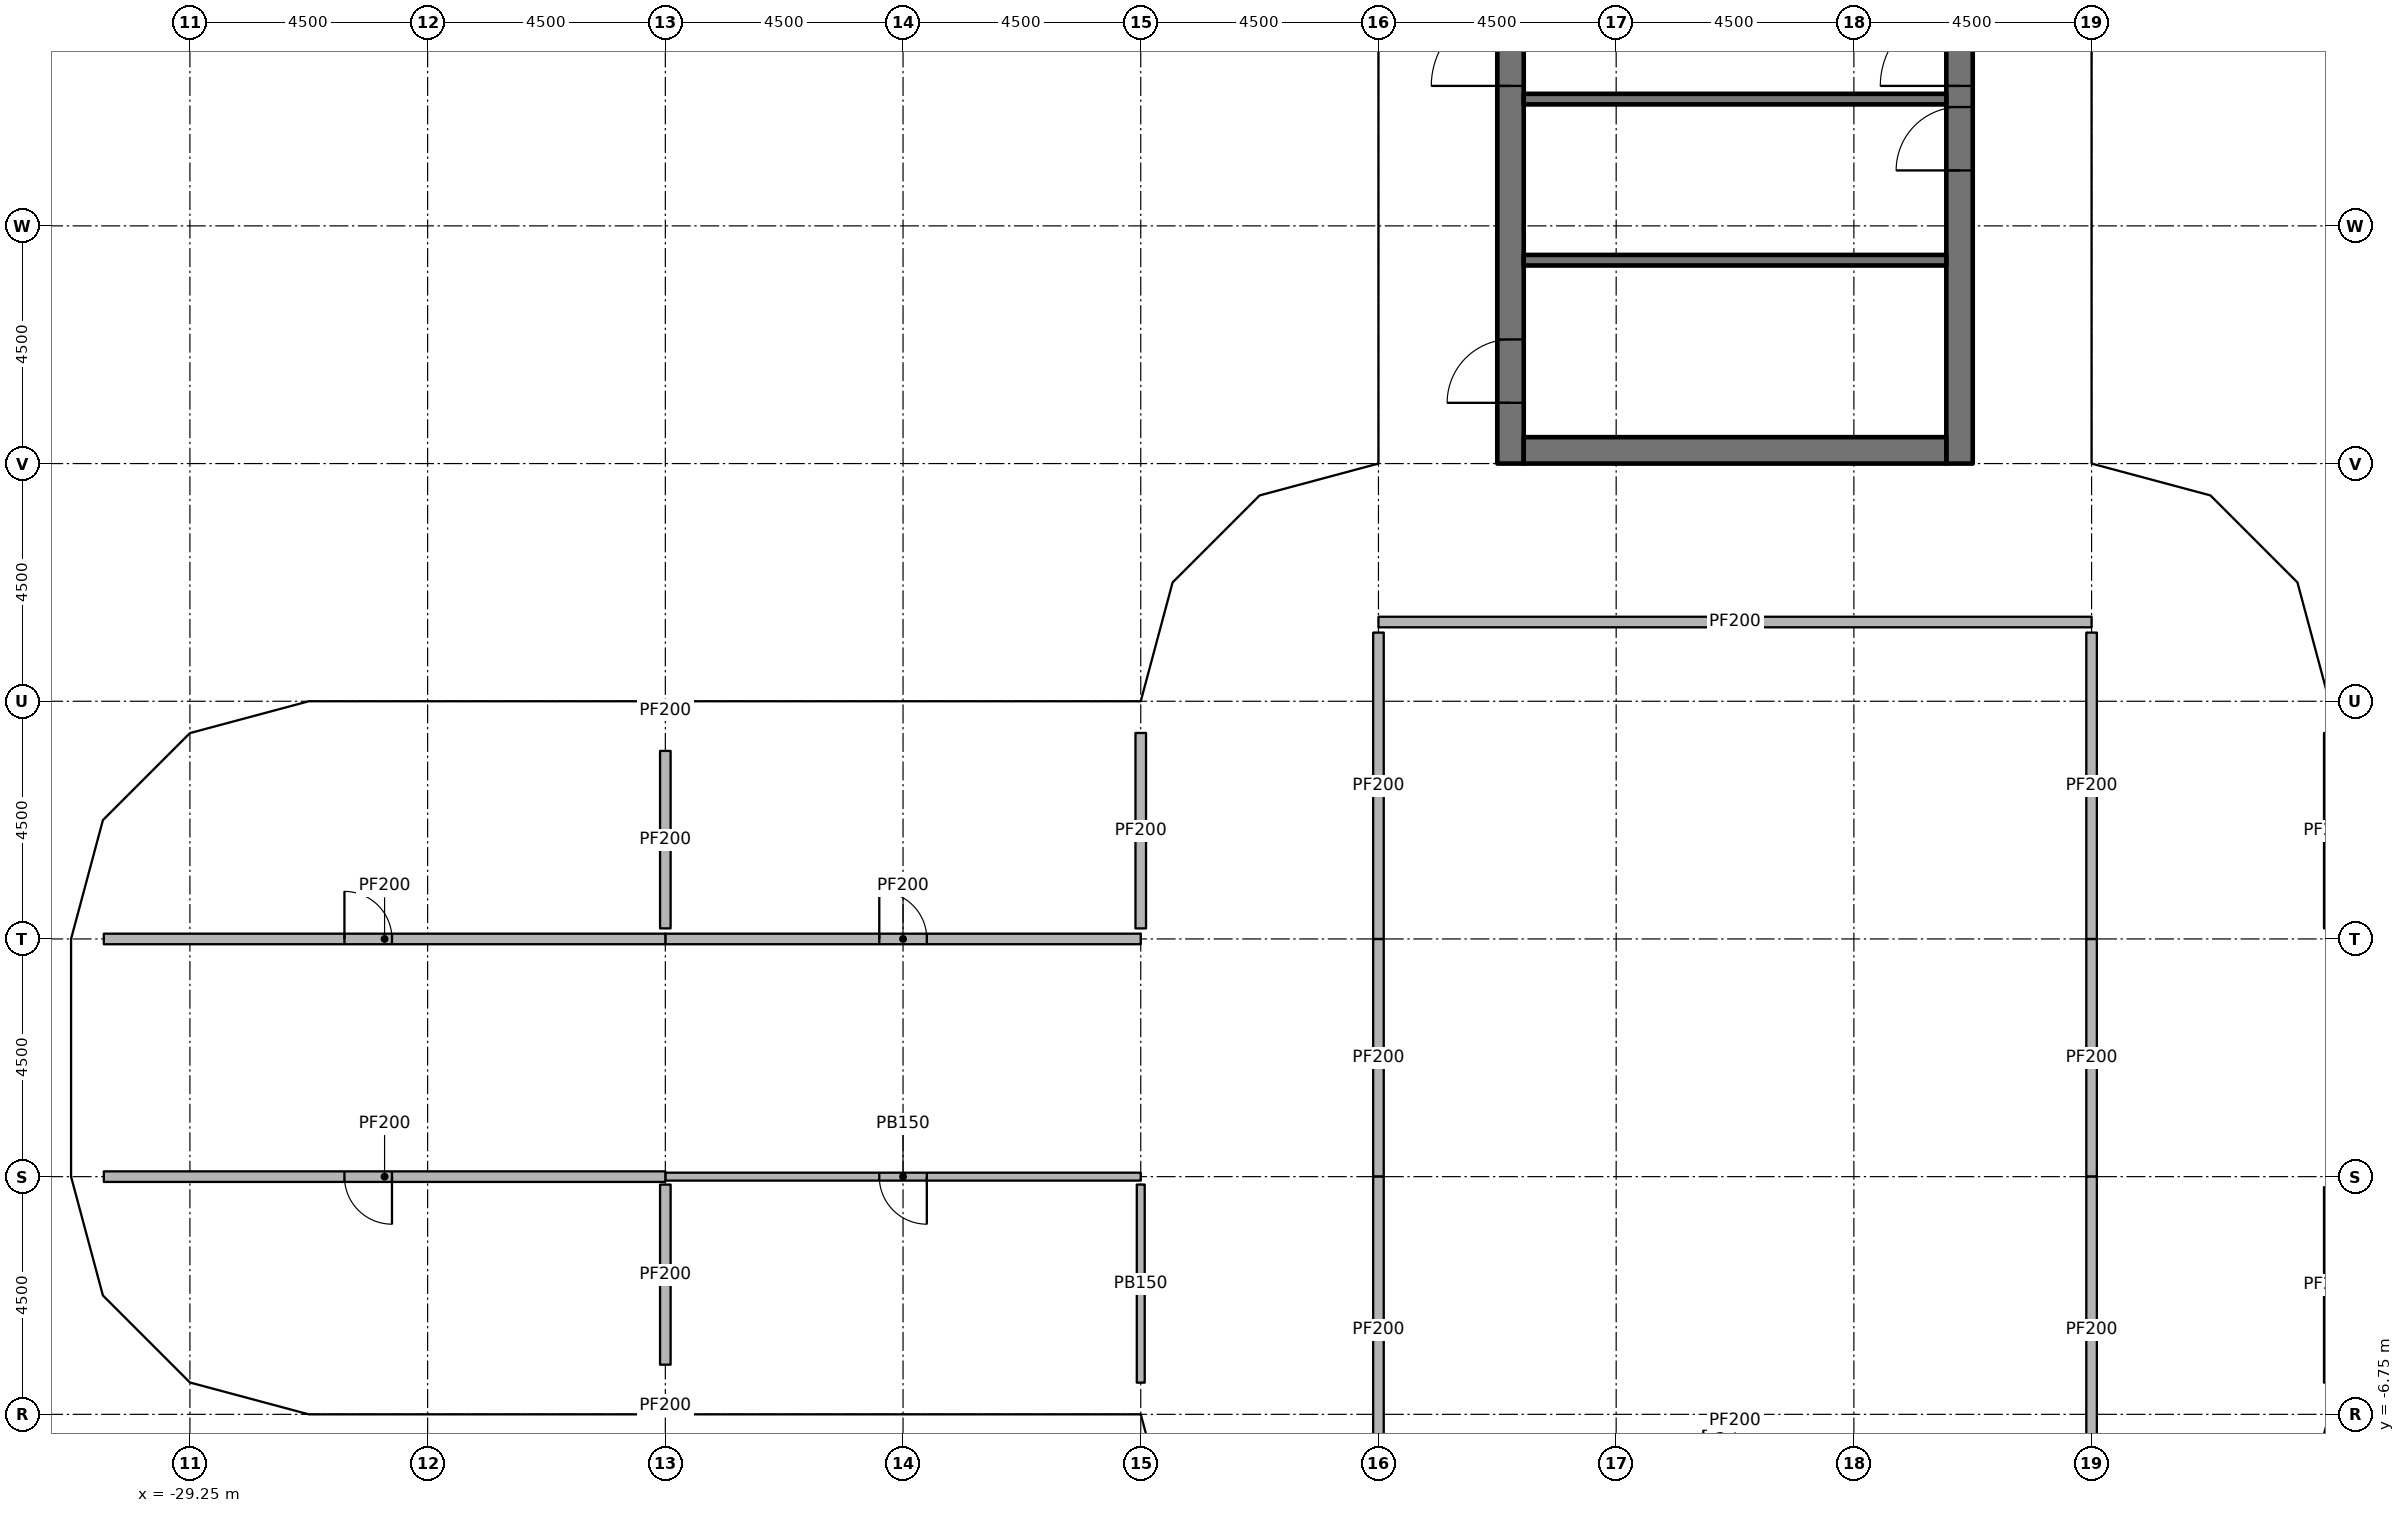
"""IFC4 building model, lengths in metres.
Left out: names, types, materials, properties, quantities, classifications, styles, units other than length and angle.
Written with IfcOpenShell. Run it as: python <this file> out.ifc"""

import sys

from ifc_helpers import new_model, si_unit, direction, frame, frame_2d, origin, origin_2d, place, context, subcontext, project, spatial, rectangle, extrude, element, fill, save


model = new_model("IFC4")
c1 = context("Model", 3, precision=1e-05, world=origin(), true_north=direction((0.0, 1.0)))
c2 = subcontext(c1, "Body", "Model", "MODEL_VIEW")
j1 = project(units=[si_unit("LENGTHUNIT", "METRE"), si_unit("PLANEANGLEUNIT", "RADIAN")], contexts=[c1])
p1 = place(None, origin())
s1 = spatial("IfcSite", under=j1, at=p1, CompositionType="ELEMENT")
p2 = place(p1, origin())
s2 = spatial("IfcBuilding", under=s1, at=p2, CompositionType="ELEMENT")
p3 = place(p2, frame((0.0, 0.0, 284.0)))
s3 = spatial("IfcBuildingStorey", under=s2, at=p3, CompositionType="ELEMENT", Elevation=284.0)
for number, where, z_axis, x_axis in (
    (1, (-28.908, -5.475, 0.0), (0.0, 0.0, 1.0), (1.0, 0.0, 0.0)),
    (2, (-28.908, 5.475, 0.0), (0.0, 0.0, 1.0), (1.0, 0.0, 0.0)),
    (3, (-24.75, -6.25, 0.0), (0.0, 0.0, 1.0), (1.0, 0.0, 0.0)),
    (4, (-24.75, 6.25, 0.0), (0.0, 0.0, 1.0), (1.0, 0.0, 0.0)),
    (5, (-20.25, -6.11, 0.0), (0.0, 0.0, 1.0), (1.0, 0.0, 0.0)),
    (6, (-20.25, 6.11, 0.0), (0.0, 0.0, 1.0), (1.0, 0.0, 0.0)),
    (7, (-15.75, -6.25, 0.0), (0.0, 0.0, 1.0), (1.0, 0.0, 0.0)),
    (8, (-15.75, 6.25, 0.0), (0.0, 0.0, 1.0), (1.0, 0.0, 0.0)),
    (9, (-10.75, -6.25, 0.0), (0.0, 0.0, 1.0), (1.0, 0.0, 0.0)),
    (10, (-10.75, 6.25, 0.0), (0.0, 0.0, 1.0), (1.0, 0.0, 0.0)),
    (11, (-6.25, -6.25, 0.0), (0.0, 0.0, 1.0), (1.0, 0.0, 0.0)),
    (12, (-6.25, 6.25, 0.0), (0.0, 0.0, 1.0), (1.0, 0.0, 0.0)),
    (13, (-6.25, 10.75, 0.0), (0.0, 0.0, 1.0), (1.0, 0.0, 0.0)),
    (14, (-6.25, 15.75, 0.0), (0.0, 0.0, 1.0), (1.0, 0.0, 0.0)),
    (15, (6.25, -6.25, 0.0), (0.0, 0.0, 1.0), (1.0, 0.0, 0.0)),
    (16, (6.25, 6.25, 0.0), (0.0, 0.0, 1.0), (1.0, 0.0, 0.0)),
    (17, (6.25, 10.75, 0.0), (0.0, 0.0, 1.0), (1.0, 0.0, 0.0)),
    (18, (6.25, 15.75, 0.0), (0.0, 0.0, 1.0), (1.0, 0.0, 0.0)),
    (19, (10.75, -6.25, 0.0), (0.0, 0.0, 1.0), (1.0, 0.0, 0.0)),
    (20, (10.75, 6.25, 0.0), (0.0, 0.0, 1.0), (1.0, 0.0, 0.0)),
):
    element("IfcColumn", number, at=place(p3, frame(where, z_axis=z_axis, x_axis=x_axis)), inside=s3, PredefinedType="COLUMN", context=c2, shape_type="SweptSolid", body=[
        extrude(rectangle(XDim=0.6, YDim=0.6, at=origin_2d()), origin(), (0.0, 0.0, 1.0), 7.45),
    ])
p4 = place(p3, frame((-4.25, 11.25, 0.0), z_axis=(0.0, 0.0, 1.0), x_axis=(0.0, 1.0, 0.0)))
e21 = element("IfcWall", 21, at=p4, inside=s3, PredefinedType="SHEAR", context=c2, shape_type="SweptSolid", body=[
    extrude(rectangle(XDim=15.0, YDim=0.5, at=frame_2d((7.5, 0.0))), origin(), (0.0, 0.0, 1.0), 7.6),
])
p5 = place(p4, frame((7.15, 0.0, 0.0)))
e22 = element("IfcOpeningElement", 22, at=p5, cuts=e21, PredefinedType="OPENING", context=c2, shape_type="SweptSolid", body=[
    extrude(rectangle(XDim=1.5, YDim=2.3, at=frame_2d((0.75, 1.15))), frame((0.0, 0.26, 0.0), z_axis=(0.0, -1.0, 0.0), x_axis=(1.0, 0.0, 0.0)), (0.0, 0.0, 1.0), 0.52),
])
p6 = place(p4, frame((13.9, 0.0, 0.0)))
e23 = element("IfcOpeningElement", 23, at=p6, cuts=e21, PredefinedType="OPENING", context=c2, shape_type="SweptSolid", body=[
    extrude(rectangle(XDim=0.9, YDim=2.1, at=frame_2d((0.45, 1.05))), frame((0.0, 0.26, 0.0), z_axis=(0.0, -1.0, 0.0), x_axis=(1.0, 0.0, 0.0)), (0.0, 0.0, 1.0), 0.52),
])
p7 = place(p4, frame((1.15, 0.0, 0.0)))
e24 = element("IfcOpeningElement", 24, at=p7, cuts=e21, PredefinedType="OPENING", context=c2, shape_type="SweptSolid", body=[
    extrude(rectangle(XDim=1.2, YDim=2.1, at=frame_2d((0.6, 1.05))), frame((0.0, 0.26, 0.0), z_axis=(0.0, -1.0, 0.0), x_axis=(1.0, 0.0, 0.0)), (0.0, 0.0, 1.0), 0.52),
])
p8 = place(p3, frame((4.25, 11.25, 0.0), z_axis=(0.0, 0.0, 1.0), x_axis=(0.0, 1.0, 0.0)))
e25 = element("IfcWall", 25, at=p8, inside=s3, PredefinedType="SHEAR", context=c2, shape_type="SweptSolid", body=[
    extrude(rectangle(XDim=15.0, YDim=0.5, at=frame_2d((7.5, 0.0))), origin(), (0.0, 0.0, 1.0), 7.6),
])
p9 = place(p8, frame((7.15, 0.0, 0.0)))
e26 = element("IfcOpeningElement", 26, at=p9, cuts=e25, PredefinedType="OPENING", context=c2, shape_type="SweptSolid", body=[
    extrude(rectangle(XDim=1.5, YDim=2.3, at=frame_2d((0.75, 1.15))), frame((0.0, 0.26, 0.0), z_axis=(0.0, -1.0, 0.0), x_axis=(1.0, 0.0, 0.0)), (0.0, 0.0, 1.0), 0.52),
])
p10 = place(p8, frame((5.55, 0.0, 0.0)))
e27 = element("IfcOpeningElement", 27, at=p10, cuts=e25, PredefinedType="OPENING", context=c2, shape_type="SweptSolid", body=[
    extrude(rectangle(XDim=1.2, YDim=2.1, at=frame_2d((0.6, 1.05))), frame((0.0, 0.26, 0.0), z_axis=(0.0, -1.0, 0.0), x_axis=(1.0, 0.0, 0.0)), (0.0, 0.0, 1.0), 0.52),
])
p11 = place(p3, frame((-4.0, 11.5, 0.0), z_axis=(0.0, 0.0, 1.0), x_axis=(1.0, 0.0, 0.0)))
e28 = element("IfcWall", 28, at=p11, inside=s3, PredefinedType="SHEAR", context=c2, shape_type="SweptSolid", body=[
    extrude(rectangle(XDim=8.0, YDim=0.5, at=frame_2d((4.0, 0.0))), origin(), (0.0, 0.0, 1.0), 7.6),
])
for number, where, z_axis, x_axis in (
    (29, (-4.0, 18.15, 0.0), (0.0, 0.0, 1.0), (1.0, 0.0, 0.0)),
    (30, (-4.0, 15.1, 0.0), (0.0, 0.0, 1.0), (1.0, 0.0, 0.0)),
):
    element("IfcWall", number, at=place(p3, frame(where, z_axis=z_axis, x_axis=x_axis)), inside=s3, PredefinedType="SHEAR", context=c2, shape_type="SweptSolid", body=[
        extrude(rectangle(XDim=8.0, YDim=0.2, at=frame_2d((4.0, 0.0))), origin(), (0.0, 0.0, 1.0), 7.45),
    ])
p12 = place(p3, frame((-6.75, 8.25, 0.0), z_axis=(0.0, 0.0, 1.0), x_axis=(1.0, 0.0, 0.0)))
e31 = element("IfcWall", 31, at=p12, inside=s3, PredefinedType="PARTITIONING", context=c2, shape_type="SweptSolid", body=[
    extrude(rectangle(XDim=13.5, YDim=0.2, at=frame_2d((6.75, 0.0))), origin(), (0.0, 0.0, 1.0), 7.45),
])
for number, where, z_axis, x_axis in (
    (32, (6.75, 2.25, 0.0), (0.0, 0.0, 1.0), (0.0, -1.0, 0.0)),
    (33, (-6.75, -2.25, 0.0), (0.0, 0.0, 1.0), (0.0, 1.0, 0.0)),
):
    element("IfcWall", number, at=place(p3, frame(where, z_axis=z_axis, x_axis=x_axis)), inside=s3, PredefinedType="PARTITIONING", context=c2, shape_type="SweptSolid", body=[
        extrude(rectangle(XDim=4.5, YDim=0.2, at=frame_2d((2.25, 0.0))), origin(), (0.0, 0.0, 1.0), 7.45),
    ])
for number, where, z_axis, x_axis in (
    (34, (-6.75, -8.05, 0.0), (0.0, 0.0, 1.0), (0.0, 1.0, 0.0)),
    (35, (6.75, -2.25, 0.0), (0.0, 0.0, 1.0), (0.0, -1.0, 0.0)),
    (36, (-6.75, 2.25, 0.0), (0.0, 0.0, 1.0), (0.0, 1.0, 0.0)),
    (37, (6.75, 8.05, 0.0), (0.0, 0.0, 1.0), (0.0, -1.0, 0.0)),
):
    element("IfcWall", number, at=place(p3, frame(where, z_axis=z_axis, x_axis=x_axis)), inside=s3, PredefinedType="PARTITIONING", context=c2, shape_type="SweptSolid", body=[
        extrude(rectangle(XDim=5.8, YDim=0.2, at=frame_2d((2.9, 0.0))), origin(), (0.0, 0.0, 1.0), 6.681),
    ])
p13 = place(p3, frame((-20.25, 2.25, 0.0), z_axis=(0.0, 0.0, 1.0), x_axis=(1.0, 0.0, 0.0)))
e38 = element("IfcWall", 38, at=p13, inside=s3, PredefinedType="PARTITIONING", context=c2, shape_type="SweptSolid", body=[
    extrude(rectangle(XDim=9.0, YDim=0.2, at=frame_2d((4.5, 0.0))), origin(), (0.0, 0.0, 1.0), 6.828),
])
p14 = place(p13, frame((4.05, 0.0, 0.0)))
e39 = element("IfcOpeningElement", 39, at=p14, cuts=e38, PredefinedType="OPENING", context=c2, shape_type="SweptSolid", body=[
    extrude(rectangle(XDim=0.9, YDim=2.1, at=frame_2d((0.45, 1.05))), frame((0.0, 0.11, 0.0), z_axis=(0.0, -1.0, 0.0), x_axis=(1.0, 0.0, 0.0)), (0.0, 0.0, 1.0), 0.22),
])
p15 = place(p3, frame((-11.25, -2.25, 0.0), z_axis=(0.0, 0.0, 1.0), x_axis=(-1.0, 0.0, 0.0)))
e40 = element("IfcWall", 40, at=p15, inside=s3, PredefinedType="PARTITIONING", context=c2, shape_type="SweptSolid", body=[
    extrude(rectangle(XDim=9.0, YDim=0.15, at=frame_2d((4.5, 0.0))), origin(), (0.0, 0.0, 1.0), 6.828),
])
p16 = place(p15, frame((4.05, 0.0, 0.0)))
e41 = element("IfcOpeningElement", 41, at=p16, cuts=e40, PredefinedType="OPENING", context=c2, shape_type="SweptSolid", body=[
    extrude(rectangle(XDim=0.9, YDim=2.1, at=frame_2d((0.45, 1.05))), frame((0.0, 0.085, 0.0), z_axis=(0.0, -1.0, 0.0), x_axis=(1.0, 0.0, 0.0)), (0.0, 0.0, 1.0), 0.17),
])
p17 = place(p3, frame((-30.88, 2.25, 0.0), z_axis=(0.0, 0.0, 1.0), x_axis=(1.0, 0.0, 0.0)))
e42 = element("IfcWall", 42, at=p17, inside=s3, PredefinedType="PARTITIONING", context=c2, shape_type="SweptSolid", body=[
    extrude(rectangle(XDim=10.63, YDim=0.2, at=frame_2d((5.315, 0.0))), origin(), (0.0, 0.0, 1.0), 6.53),
])
p18 = place(p17, frame((4.555, 0.0, 0.0)))
e43 = element("IfcOpeningElement", 43, at=p18, cuts=e42, PredefinedType="OPENING", context=c2, shape_type="SweptSolid", body=[
    extrude(rectangle(XDim=0.9, YDim=2.1, at=frame_2d((0.45, 1.05))), frame((0.0, 0.11, 0.0), z_axis=(0.0, -1.0, 0.0), x_axis=(1.0, 0.0, 0.0)), (0.0, 0.0, 1.0), 0.22),
])
p19 = place(p3, frame((-20.25, -2.25, 0.0), z_axis=(0.0, 0.0, 1.0), x_axis=(-1.0, 0.0, 0.0)))
e44 = element("IfcWall", 44, at=p19, inside=s3, PredefinedType="PARTITIONING", context=c2, shape_type="SweptSolid", body=[
    extrude(rectangle(XDim=10.63, YDim=0.2, at=frame_2d((5.315, 0.0))), origin(), (0.0, 0.0, 1.0), 6.53),
])
p20 = place(p19, frame((5.175, 0.0, 0.0)))
e45 = element("IfcOpeningElement", 45, at=p20, cuts=e44, PredefinedType="OPENING", context=c2, shape_type="SweptSolid", body=[
    extrude(rectangle(XDim=0.9, YDim=2.1, at=frame_2d((0.45, 1.05))), frame((0.0, 0.11, 0.0), z_axis=(0.0, -1.0, 0.0), x_axis=(1.0, 0.0, 0.0)), (0.0, 0.0, 1.0), 0.22),
])
for number, where, z_axis, x_axis in (
    (46, (11.25, 2.45, 0.0), (0.0, 0.0, 1.0), (0.0, 1.0, 0.0)),
    (47, (11.25, -6.15, 0.0), (0.0, 0.0, 1.0), (0.0, 1.0, 0.0)),
):
    element("IfcWall", number, at=place(p3, frame(where, z_axis=z_axis, x_axis=x_axis)), inside=s3, PredefinedType="PARTITIONING", context=c2, shape_type="SweptSolid", body=[
        extrude(rectangle(XDim=3.7, YDim=0.2, at=frame_2d((1.85, 0.0))), origin(), (0.0, 0.0, 1.0), 7.45),
    ])
p21 = place(p3, frame((-20.25, 2.45, 0.0), z_axis=(0.0, 0.0, 1.0), x_axis=(0.0, 1.0, 0.0)))
e48 = element("IfcWall", 48, at=p21, inside=s3, PredefinedType="PARTITIONING", context=c2, shape_type="SweptSolid", body=[
    extrude(rectangle(XDim=3.36, YDim=0.2, at=frame_2d((1.68, 0.0))), origin(), (0.0, 0.0, 1.0), 7.45),
])
p22 = place(p3, frame((-20.25, 6.41, 0.0), z_axis=(0.0, 0.0, 1.0), x_axis=(0.0, 1.0, 0.0)))
e49 = element("IfcWall", 49, at=p22, inside=s3, PredefinedType="PARTITIONING", context=c2, shape_type="SweptSolid", body=[
    extrude(rectangle(XDim=0.34, YDim=0.2, at=frame_2d((0.17, 0.0))), origin(), (0.0, 0.0, 1.0), 7.45),
])
p23 = place(p3, frame((-11.25, 6.15, 0.0), z_axis=(0.0, 0.0, 1.0), x_axis=(0.0, -1.0, 0.0)))
e50 = element("IfcWall", 50, at=p23, inside=s3, PredefinedType="PARTITIONING", context=c2, shape_type="SweptSolid", body=[
    extrude(rectangle(XDim=3.7, YDim=0.2, at=frame_2d((1.85, 0.0))), origin(), (0.0, 0.0, 1.0), 7.45),
])
p24 = place(p3, frame((-20.25, -6.75, 0.0), z_axis=(0.0, 0.0, 1.0), x_axis=(0.0, 1.0, 0.0)))
e51 = element("IfcWall", 51, at=p24, inside=s3, PredefinedType="PARTITIONING", context=c2, shape_type="SweptSolid", body=[
    extrude(rectangle(XDim=0.34, YDim=0.2, at=frame_2d((0.17, 0.0))), origin(), (0.0, 0.0, 1.0), 7.45),
])
p25 = place(p3, frame((-20.25, -5.81, 0.0), z_axis=(0.0, 0.0, 1.0), x_axis=(0.0, 1.0, 0.0)))
e52 = element("IfcWall", 52, at=p25, inside=s3, PredefinedType="PARTITIONING", context=c2, shape_type="SweptSolid", body=[
    extrude(rectangle(XDim=3.41, YDim=0.2, at=frame_2d((1.705, 0.0))), origin(), (0.0, 0.0, 1.0), 7.45),
])
p26 = place(p3, frame((-11.25, -2.4, 0.0), z_axis=(0.0, 0.0, 1.0), x_axis=(0.0, -1.0, 0.0)))
e53 = element("IfcWall", 53, at=p26, inside=s3, PredefinedType="PARTITIONING", context=c2, shape_type="SweptSolid", body=[
    extrude(rectangle(XDim=3.75, YDim=0.15, at=frame_2d((1.875, 0.0))), origin(), (0.0, 0.0, 1.0), 7.45),
])
p27 = place(p5, origin())
e54 = element("IfcDoor", 54, at=p27, inside=s3, OperationType="DOUBLE_DOOR_SINGLE_SWING", PredefinedType="DOOR", context=c2, shape_type="SweptSolid", body=[
    extrude(rectangle(XDim=1.5, YDim=2.3, at=frame_2d((0.75, 1.15))), frame((0.0, 0.025, 0.0), z_axis=(0.0, -1.0, 0.0), x_axis=(1.0, 0.0, 0.0)), (0.0, 0.0, 1.0), 0.05),
])
fill(e22, e54)
p28 = place(p9, origin())
e55 = element("IfcDoor", 55, at=p28, inside=s3, OperationType="DOUBLE_DOOR_SINGLE_SWING", PredefinedType="DOOR", context=c2, shape_type="SweptSolid", body=[
    extrude(rectangle(XDim=1.5, YDim=2.3, at=frame_2d((0.75, 1.15))), frame((0.0, 0.025, 0.0), z_axis=(0.0, -1.0, 0.0), x_axis=(1.0, 0.0, 0.0)), (0.0, 0.0, 1.0), 0.05),
])
fill(e26, e55)
p29 = place(p10, origin())
e56 = element("IfcDoor", 56, at=p29, inside=s3, OperationType="SINGLE_SWING_LEFT", PredefinedType="DOOR", context=c2, shape_type="SweptSolid", body=[
    extrude(rectangle(XDim=1.2, YDim=2.1, at=frame_2d((0.6, 1.05))), frame((0.0, 0.025, 0.0), z_axis=(0.0, -1.0, 0.0), x_axis=(1.0, 0.0, 0.0)), (0.0, 0.0, 1.0), 0.05),
])
fill(e27, e56)
p30 = place(p7, origin())
e57 = element("IfcDoor", 57, at=p30, inside=s3, OperationType="SINGLE_SWING_LEFT", PredefinedType="DOOR", context=c2, shape_type="SweptSolid", body=[
    extrude(rectangle(XDim=1.2, YDim=2.1, at=frame_2d((0.6, 1.05))), frame((0.0, 0.025, 0.0), z_axis=(0.0, -1.0, 0.0), x_axis=(1.0, 0.0, 0.0)), (0.0, 0.0, 1.0), 0.05),
])
fill(e24, e57)
p31 = place(p14, origin())
e58 = element("IfcDoor", 58, at=p31, inside=s3, OperationType="SINGLE_SWING_LEFT", PredefinedType="DOOR", context=c2, shape_type="SweptSolid", body=[
    extrude(rectangle(XDim=0.9, YDim=2.1, at=frame_2d((0.45, 1.05))), frame((0.0, 0.025, 0.0), z_axis=(0.0, -1.0, 0.0), x_axis=(1.0, 0.0, 0.0)), (0.0, 0.0, 1.0), 0.05),
])
fill(e39, e58)
p32 = place(p16, origin())
e59 = element("IfcDoor", 59, at=p32, inside=s3, OperationType="SINGLE_SWING_LEFT", PredefinedType="DOOR", context=c2, shape_type="SweptSolid", body=[
    extrude(rectangle(XDim=0.9, YDim=2.1, at=frame_2d((0.45, 1.05))), frame((0.0, 0.025, 0.0), z_axis=(0.0, -1.0, 0.0), x_axis=(1.0, 0.0, 0.0)), (0.0, 0.0, 1.0), 0.05),
])
fill(e41, e59)
p33 = place(p18, origin())
e60 = element("IfcDoor", 60, at=p33, inside=s3, OperationType="SINGLE_SWING_LEFT", PredefinedType="DOOR", context=c2, shape_type="SweptSolid", body=[
    extrude(rectangle(XDim=0.9, YDim=2.1, at=frame_2d((0.45, 1.05))), frame((0.0, 0.025, 0.0), z_axis=(0.0, -1.0, 0.0), x_axis=(1.0, 0.0, 0.0)), (0.0, 0.0, 1.0), 0.05),
])
fill(e43, e60)
p34 = place(p20, origin())
e61 = element("IfcDoor", 61, at=p34, inside=s3, OperationType="SINGLE_SWING_LEFT", PredefinedType="DOOR", context=c2, shape_type="SweptSolid", body=[
    extrude(rectangle(XDim=0.9, YDim=2.1, at=frame_2d((0.45, 1.05))), frame((0.0, 0.025, 0.0), z_axis=(0.0, -1.0, 0.0), x_axis=(1.0, 0.0, 0.0)), (0.0, 0.0, 1.0), 0.05),
])
fill(e45, e61)
save(model, sys.argv[1])
